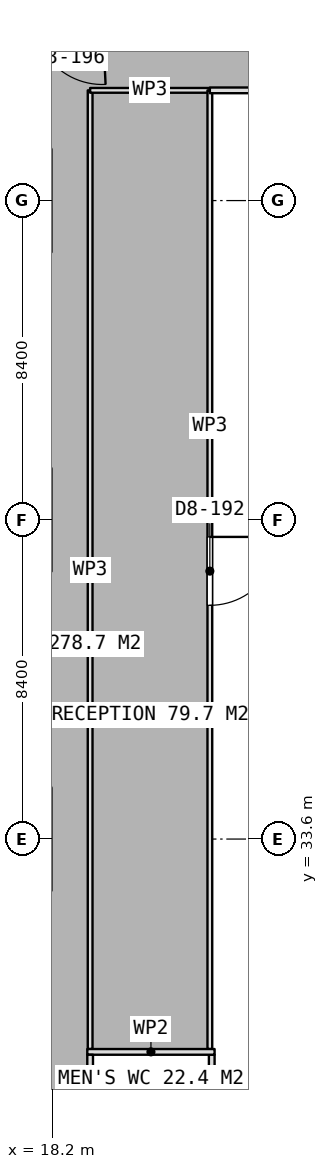
"""IFC4 building model, lengths in metres.
Left out: names, types, materials, properties, quantities, classifications, styles, units other than length and angle.
Written with IfcOpenShell. Run it as: python <this file> out.ifc"""

import sys

from ifc_helpers import new_model, si_unit, direction, frame, frame_2d, origin, place, context, subcontext, project, spatial, rectangle, extrude, element, fill, save


model = new_model("IFC4")
c1 = context("Model", 3, precision=1e-05, world=origin(), true_north=direction((0.0, 1.0)))
c2 = subcontext(c1, "Body", "Model", "MODEL_VIEW")
j1 = project(units=[si_unit("LENGTHUNIT", "METRE"), si_unit("PLANEANGLEUNIT", "RADIAN")], contexts=[c1])
p1 = place(None, origin())
s1 = spatial("IfcSite", under=j1, at=p1, CompositionType="ELEMENT")
p2 = place(p1, origin())
s2 = spatial("IfcBuilding", under=s1, at=p2, CompositionType="ELEMENT")
p3 = place(p2, frame((0.0, 0.0, 172.7)))
s3 = spatial("IfcBuildingStorey", under=s2, at=p3, CompositionType="ELEMENT", Elevation=172.7)
p4 = place(p3, frame((19.125, 28.0, 0.0), z_axis=(0.0, 0.0, 1.0), x_axis=(1.0, 0.0, 0.0)))
e1 = element("IfcWall", 1, at=p4, inside=s3, PredefinedType="PARTITIONING", context=c2, shape_type="SweptSolid", body=[
    extrude(rectangle(XDim=3.35, YDim=0.15, at=frame_2d((1.675, 0.0))), origin(), (0.0, 0.0, 1.0), 3.5),
])
p5 = place(p3, frame((19.2, 21.075, 0.0), z_axis=(0.0, 0.0, 1.0), x_axis=(0.0, 1.0, 0.0)))
e2 = element("IfcWall", 2, at=p5, inside=s3, PredefinedType="PARTITIONING", context=c2, shape_type="SweptSolid", body=[
    extrude(rectangle(XDim=6.85, YDim=0.15, at=frame_2d((3.425, 0.0))), origin(), (0.0, 0.0, 1.0), 3.5),
])
p6 = place(p3, frame((22.4, 21.075, 0.0), z_axis=(0.0, 0.0, 1.0), x_axis=(0.0, 1.0, 0.0)))
e3 = element("IfcWall", 3, at=p6, inside=s3, PredefinedType="PARTITIONING", context=c2, shape_type="SweptSolid", body=[
    extrude(rectangle(XDim=6.85, YDim=0.15, at=frame_2d((3.425, 0.0))), origin(), (0.0, 0.0, 1.0), 3.5),
])
p7 = place(p6, frame((2.925, 0.0, 0.0)))
e4 = element("IfcOpeningElement", 4, at=p7, cuts=e3, PredefinedType="OPENING", context=c2, shape_type="SweptSolid", body=[
    extrude(rectangle(XDim=1.0, YDim=2.1, at=frame_2d((0.5, 1.05))), frame((0.0, 0.085, 0.0), z_axis=(0.0, -1.0, 0.0), x_axis=(1.0, 0.0, 0.0)), (0.0, 0.0, 1.0), 0.17),
])
p8 = place(p3, frame((19.2, 28.075, 0.0), z_axis=(0.0, 0.0, 1.0), x_axis=(0.0, 1.0, 0.0)))
e5 = element("IfcWall", 5, at=p8, inside=s3, PredefinedType="PARTITIONING", context=c2, shape_type="SweptSolid", body=[
    extrude(rectangle(XDim=25.225, YDim=0.125, at=frame_2d((12.613, 0.0))), origin(), (0.0, 0.0, 1.0), 3.5),
])
p9 = place(p3, frame((19.2, 53.3, 0.0), z_axis=(0.0, 0.0, 1.0), x_axis=(1.0, 0.0, 0.0)))
e6 = element("IfcWall", 6, at=p9, inside=s3, PredefinedType="PARTITIONING", context=c2, shape_type="SweptSolid", body=[
    extrude(rectangle(XDim=3.15, YDim=0.125, at=frame_2d((1.575, 0.0))), origin(), (0.0, 0.0, 1.0), 3.5),
])
p10 = place(p3, frame((22.35, 53.3, 0.0), z_axis=(0.0, 0.0, 1.0), x_axis=(0.0, -1.0, 0.0)))
e7 = element("IfcWall", 7, at=p10, inside=s3, PredefinedType="PARTITIONING", context=c2, shape_type="SweptSolid", body=[
    extrude(rectangle(XDim=25.225, YDim=0.125, at=frame_2d((12.613, 0.0))), origin(), (0.0, 0.0, 1.0), 3.5),
])
p11 = place(p10, frame((11.75, 0.0, 0.0)))
e8 = element("IfcOpeningElement", 8, at=p11, cuts=e7, PredefinedType="OPENING", context=c2, shape_type="SweptSolid", body=[
    extrude(rectangle(XDim=1.8, YDim=2.1, at=frame_2d((0.9, 1.05))), frame((0.0, 0.073, 0.0), z_axis=(0.0, -1.0, 0.0), x_axis=(1.0, 0.0, 0.0)), (0.0, 0.0, 1.0), 0.145),
])
p12 = place(p3, frame((25.6, 53.3, 0.0), z_axis=(0.0, 0.0, 1.0), x_axis=(-1.0, 0.0, 0.0)))
e9 = element("IfcWall", 9, at=p12, inside=s3, PredefinedType="PARTITIONING", context=c2, shape_type="SweptSolid", body=[
    extrude(rectangle(XDim=3.25, YDim=0.15, at=frame_2d((1.625, 0.0))), origin(), (0.0, 0.0, 1.0), 3.5),
])
p13 = place(p11, origin())
e10 = element("IfcDoor", 10, at=p13, inside=s3, OperationType="DOUBLE_DOOR_SINGLE_SWING", PredefinedType="DOOR", context=c2, shape_type="SweptSolid", body=[
    extrude(rectangle(XDim=1.8, YDim=2.1, at=frame_2d((0.9, 1.05))), frame((0.0, 0.025, 0.0), z_axis=(0.0, -1.0, 0.0), x_axis=(1.0, 0.0, 0.0)), (0.0, 0.0, 1.0), 0.05),
])
fill(e8, e10)
save(model, sys.argv[1])
